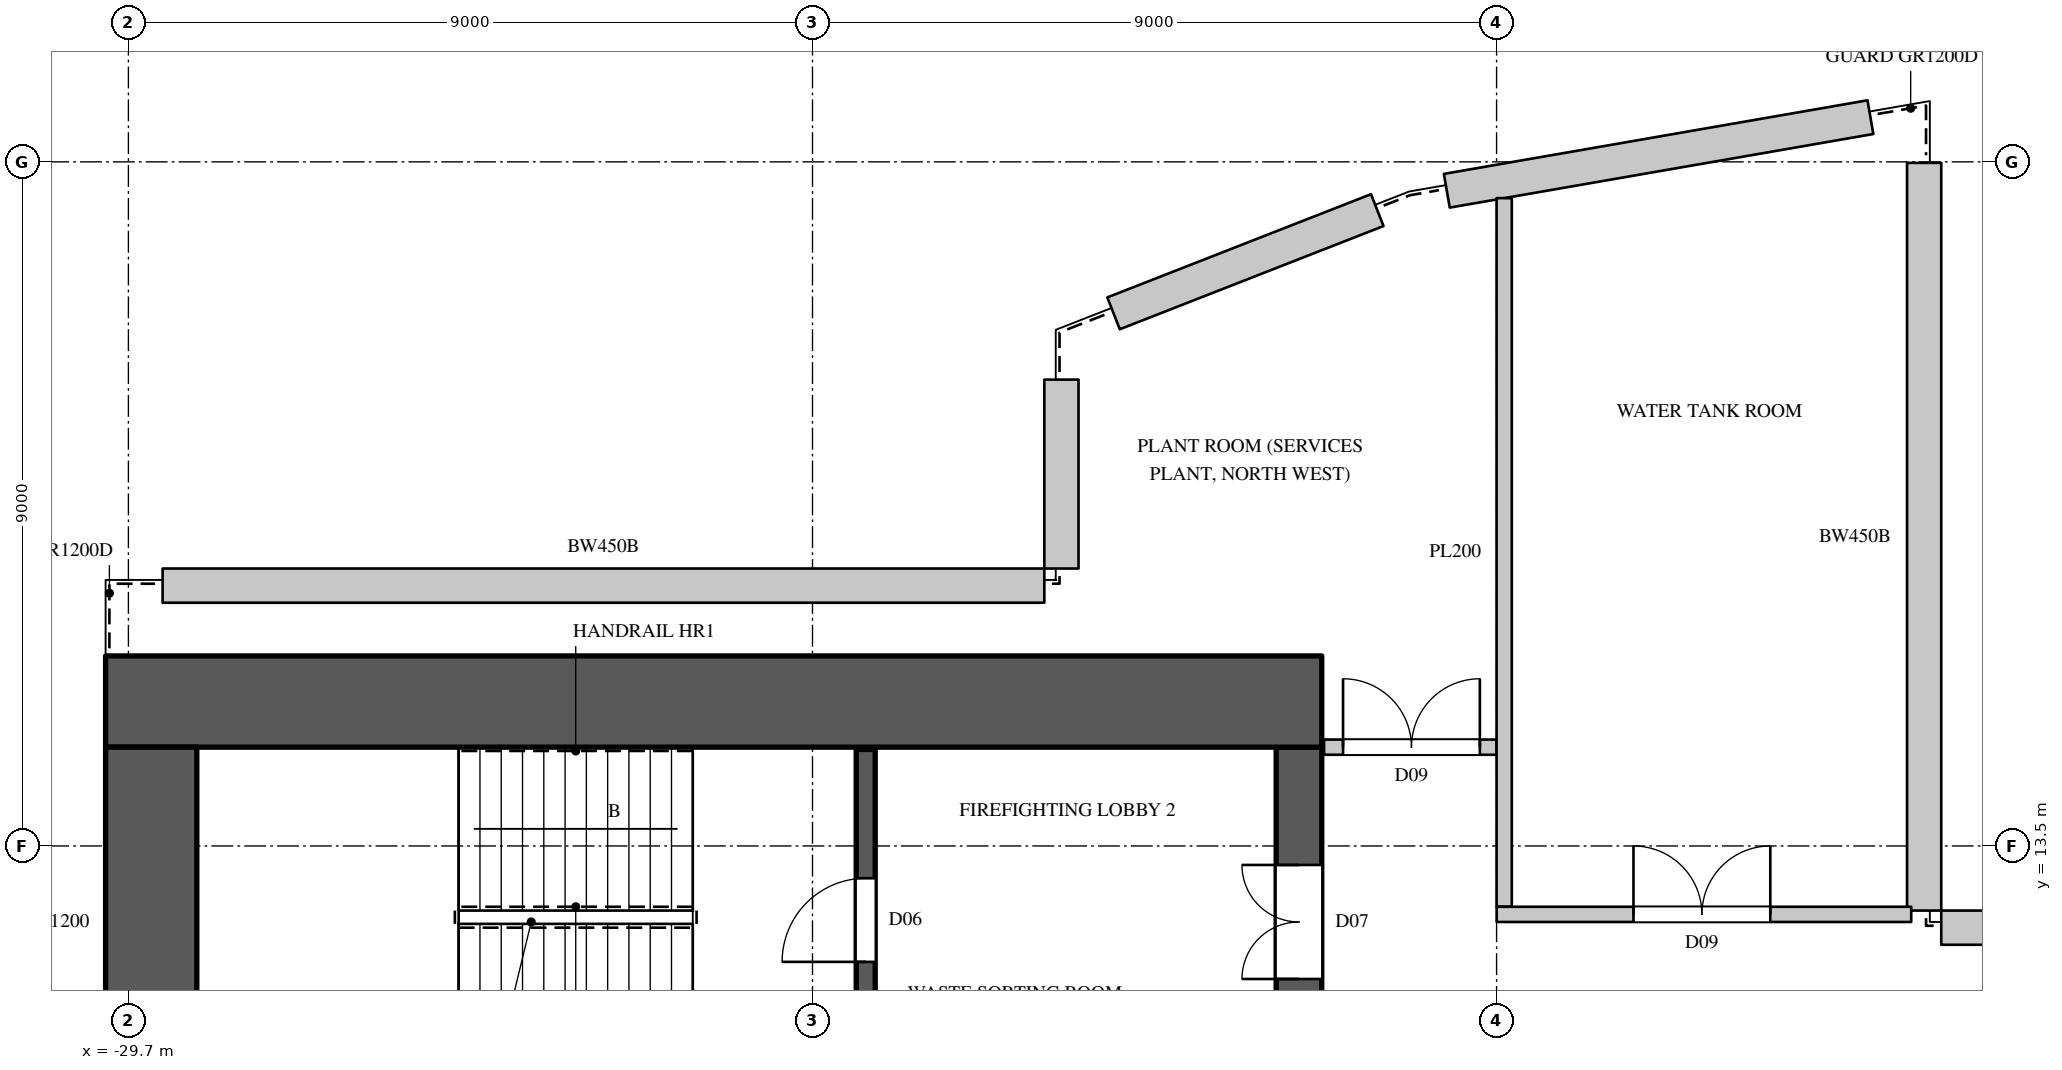
"""IFC4 building model, lengths in metres.
Left out: names, types, materials, properties, quantities, classifications, styles, units other than length and angle.
Written with IfcOpenShell. Run it as: python <this file> out.ifc"""

import sys

from ifc_helpers import new_model, si_unit, direction, frame, frame_2d, origin, place, context, subcontext, project, spatial, rectangle, extrude, element, fill, save


model = new_model("IFC4")
c1 = context("Model", 3, precision=1e-05, world=origin(), true_north=direction((0.0, 1.0)))
c2 = subcontext(c1, "Body", "Model", "MODEL_VIEW")
j1 = project(units=[si_unit("LENGTHUNIT", "METRE"), si_unit("PLANEANGLEUNIT", "RADIAN")], contexts=[c1])
p1 = place(None, origin())
s1 = spatial("IfcSite", under=j1, at=p1, CompositionType="ELEMENT")
p2 = place(p1, origin())
s2 = spatial("IfcBuilding", under=s1, at=p2, CompositionType="ELEMENT")
p3 = place(p2, frame((0.0, 0.0, 347.0)))
s3 = spatial("IfcBuildingStorey", under=s2, at=p3, CompositionType="ELEMENT", Elevation=347.0)
p4 = place(p3, frame((7.85, 12.425, 0.0), z_axis=(0.0, 0.0, 1.0), x_axis=(-1.0, 0.0, 0.0)))
e1 = element("IfcWall", 1, at=p4, inside=s3, PredefinedType="SOLIDWALL", context=c2, shape_type="SweptSolid", body=[
    extrude(rectangle(XDim=13.7, YDim=0.45, at=frame_2d((6.85, 0.0))), origin(), (0.0, 0.0, 1.0), 3.7),
])
p5 = place(p3, frame((-6.075, 12.65, 0.0), z_axis=(0.0, 0.0, 1.0), x_axis=(0.0, 1.0, 0.0)))
e2 = element("IfcWall", 2, at=p5, inside=s3, PredefinedType="SOLIDWALL", context=c2, shape_type="SweptSolid", body=[
    extrude(rectangle(XDim=9.837, YDim=0.45, at=frame_2d((4.918, 0.0))), origin(), (0.0, 0.0, 1.0), 3.7),
])
p6 = place(p3, frame((-6.782, 23.088, 0.0), z_axis=(0.0, 0.0, 1.0), x_axis=(-0.985240251318, -0.171177239091, 0.0)))
e3 = element("IfcWall", 3, at=p6, inside=s3, PredefinedType="SOLIDWALL", context=c2, shape_type="SweptSolid", body=[
    extrude(rectangle(XDim=5.656, YDim=0.45, at=frame_2d((2.828, 0.0))), origin(), (0.0, 0.0, 1.0), 3.7),
])
p7 = place(p3, frame((-13.27, 21.865, 0.0), z_axis=(0.0, 0.0, 1.0), x_axis=(-0.931207968362, -0.364488298384, 0.0)))
e4 = element("IfcWall", 4, at=p7, inside=s3, PredefinedType="SOLIDWALL", context=c2, shape_type="SweptSolid", body=[
    extrude(rectangle(XDim=3.726, YDim=0.45, at=frame_2d((1.863, 0.0))), origin(), (0.0, 0.0, 1.0), 3.7),
])
p8 = place(p3, frame((-17.425, 19.635, 0.0), z_axis=(0.0, 0.0, 1.0), x_axis=(0.0, -1.0, 0.0)))
e5 = element("IfcWall", 5, at=p8, inside=s3, PredefinedType="SOLIDWALL", context=c2, shape_type="SweptSolid", body=[
    extrude(rectangle(XDim=2.485, YDim=0.45, at=frame_2d((1.243, 0.0))), origin(), (0.0, 0.0, 1.0), 3.7),
])
p9 = place(p3, frame((-17.65, 16.925, 0.0), z_axis=(0.0, 0.0, 1.0), x_axis=(-1.0, 0.0, 0.0)))
e6 = element("IfcWall", 6, at=p9, inside=s3, PredefinedType="SOLIDWALL", context=c2, shape_type="SweptSolid", body=[
    extrude(rectangle(XDim=11.6, YDim=0.45, at=frame_2d((5.8, 0.0))), origin(), (0.0, 0.0, 1.0), 3.7),
])
p10 = place(p3, frame((-30.0, 15.4, 0.0), z_axis=(0.0, 0.0, 1.0), x_axis=(1.0, 0.0, 0.0)))
e7 = element("IfcWall", 7, at=p10, inside=s3, PredefinedType="SHEAR", context=c2, shape_type="SweptSolid", body=[
    extrude(rectangle(XDim=16.0, YDim=1.2, at=frame_2d((8.0, 0.0))), origin(), (0.0, 0.0, 1.0), 4.0),
])
p11 = place(p3, frame((-14.3, -14.8, 0.0), z_axis=(0.0, 0.0, 1.0), x_axis=(0.0, 1.0, 0.0)))
e8 = element("IfcWall", 8, at=p11, inside=s3, PredefinedType="SHEAR", context=c2, shape_type="SweptSolid", body=[
    extrude(rectangle(XDim=29.6, YDim=0.6, at=frame_2d((14.8, 0.0))), origin(), (0.0, 0.0, 1.0), 4.0),
])
p12 = place(p11, frame((1.55, 0.0, 0.0)))
e9 = element("IfcOpeningElement", 9, at=p12, cuts=e8, PredefinedType="OPENING", context=c2, shape_type="SweptSolid", body=[
    extrude(rectangle(XDim=1.5, YDim=2.4, at=frame_2d((0.75, 1.2))), frame((0.0, 0.31, 0.0), z_axis=(0.0, -1.0, 0.0), x_axis=(1.0, 0.0, 0.0)), (0.0, 0.0, 1.0), 0.62),
])
p13 = place(p11, frame((26.55, 0.0, 0.0)))
e10 = element("IfcOpeningElement", 10, at=p13, cuts=e8, PredefinedType="OPENING", context=c2, shape_type="SweptSolid", body=[
    extrude(rectangle(XDim=1.5, YDim=2.4, at=frame_2d((0.75, 1.2))), frame((0.0, 0.31, 0.0), z_axis=(0.0, -1.0, 0.0), x_axis=(1.0, 0.0, 0.0)), (0.0, 0.0, 1.0), 0.62),
])
p14 = place(p11, frame((8.45, 0.0, 0.0)))
e11 = element("IfcOpeningElement", 11, at=p14, cuts=e8, PredefinedType="OPENING", context=c2, shape_type="SweptSolid", body=[
    extrude(rectangle(XDim=1.5, YDim=2.4, at=frame_2d((0.75, 1.2))), frame((0.0, 0.31, 0.0), z_axis=(0.0, -1.0, 0.0), x_axis=(1.0, 0.0, 0.0)), (0.0, 0.0, 1.0), 0.62),
])
p15 = place(p11, frame((19.65, 0.0, 0.0)))
e12 = element("IfcOpeningElement", 12, at=p15, cuts=e8, PredefinedType="OPENING", context=c2, shape_type="SweptSolid", body=[
    extrude(rectangle(XDim=1.5, YDim=2.4, at=frame_2d((0.75, 1.2))), frame((0.0, 0.31, 0.0), z_axis=(0.0, -1.0, 0.0), x_axis=(1.0, 0.0, 0.0)), (0.0, 0.0, 1.0), 0.62),
])
p16 = place(p11, frame((14.5, 0.0, 0.0)))
e13 = element("IfcOpeningElement", 13, at=p16, cuts=e8, PredefinedType="OPENING", context=c2, shape_type="SweptSolid", body=[
    extrude(rectangle(XDim=0.6, YDim=2.0, at=frame_2d((0.3, 1.0))), frame((0.0, 0.31, 0.0), z_axis=(0.0, -1.0, 0.0), x_axis=(1.0, 0.0, 0.0)), (0.0, 0.0, 1.0), 0.62),
])
p17 = place(p3, frame((-29.4, 10.2, 0.0), z_axis=(0.0, 0.0, 1.0), x_axis=(0.0, 1.0, 0.0)))
e14 = element("IfcWall", 14, at=p17, inside=s3, PredefinedType="SHEAR", context=c2, shape_type="SweptSolid", body=[
    extrude(rectangle(XDim=4.6, YDim=1.2, at=frame_2d((2.3, 0.0))), origin(), (0.0, 0.0, 1.0), 4.0),
])
p18 = place(p3, frame((-13.97, 14.8, 0.0), z_axis=(0.0, 0.0, 1.0), x_axis=(1.0, 0.0, 0.0)))
e15 = element("IfcWall", 15, at=p18, inside=s3, PredefinedType="PARTITIONING", context=c2, shape_type="SweptSolid", body=[
    extrude(rectangle(XDim=2.27, YDim=0.2, at=frame_2d((1.135, 0.0))), origin(), (0.0, 0.0, 1.0), 3.598),
])
p19 = place(p18, frame((0.25, 0.0, 0.0)))
e16 = element("IfcOpeningElement", 16, at=p19, cuts=e15, PredefinedType="OPENING", context=c2, shape_type="SweptSolid", body=[
    extrude(rectangle(XDim=1.8, YDim=2.4, at=frame_2d((0.9, 1.2))), frame((0.0, 0.11, 0.0), z_axis=(0.0, -1.0, 0.0), x_axis=(1.0, 0.0, 0.0)), (0.0, 0.0, 1.0), 0.22),
])
p20 = place(p3, frame((-11.6, 12.701, 0.0), z_axis=(0.0, 0.0, 1.0), x_axis=(0.0, 1.0, 0.0)))
e17 = element("IfcWall", 17, at=p20, inside=s3, PredefinedType="PARTITIONING", context=c2, shape_type="SweptSolid", body=[
    extrude(rectangle(XDim=9.322, YDim=0.2, at=frame_2d((4.661, 0.0))), origin(), (0.0, 0.0, 1.0), 3.598),
])
p21 = place(p3, frame((-11.699, 12.6, 0.0), z_axis=(0.0, 0.0, 1.0), x_axis=(1.0, 0.0, 0.0)))
e18 = element("IfcWall", 18, at=p21, inside=s3, PredefinedType="PARTITIONING", context=c2, shape_type="SweptSolid", body=[
    extrude(rectangle(XDim=5.454, YDim=0.2, at=frame_2d((2.727, 0.0))), origin(), (0.0, 0.0, 1.0), 3.598),
])
p22 = place(p21, frame((1.8, 0.0, 0.0)))
e19 = element("IfcOpeningElement", 19, at=p22, cuts=e18, PredefinedType="OPENING", context=c2, shape_type="SweptSolid", body=[
    extrude(rectangle(XDim=1.8, YDim=2.4, at=frame_2d((0.9, 1.2))), frame((0.0, 0.11, 0.0), z_axis=(0.0, -1.0, 0.0), x_axis=(1.0, 0.0, 0.0)), (0.0, 0.0, 1.0), 0.22),
])
p23 = place(p3, frame((-20.0, 10.325, 0.0), z_axis=(0.0, 0.0, 1.0), x_axis=(0.0, 1.0, 0.0)))
e20 = element("IfcWall", 20, at=p23, inside=s3, PredefinedType="SHEAR", context=c2, shape_type="SweptSolid", body=[
    extrude(rectangle(XDim=4.445, YDim=0.25, at=frame_2d((2.223, 0.0))), origin(), (0.0, 0.0, 1.0), 3.598),
])
p24 = place(p23, frame((1.65, 0.0, 0.0)))
e21 = element("IfcOpeningElement", 21, at=p24, cuts=e20, PredefinedType="OPENING", context=c2, shape_type="SweptSolid", body=[
    extrude(rectangle(XDim=1.1, YDim=2.2, at=frame_2d((0.55, 1.1))), frame((0.0, 0.135, 0.0), z_axis=(0.0, -1.0, 0.0), x_axis=(1.0, 0.0, 0.0)), (0.0, 0.0, 1.0), 0.27),
])
p25 = place(p24, origin())
e22 = element("IfcDoor", 22, at=p25, inside=s3, OperationType="SINGLE_SWING_LEFT", PredefinedType="DOOR", context=c2, shape_type="SweptSolid", body=[
    extrude(rectangle(XDim=1.1, YDim=2.2, at=frame_2d((0.55, 1.1))), frame((0.0, 0.025, 0.0), z_axis=(0.0, -1.0, 0.0), x_axis=(1.0, 0.0, 0.0)), (0.0, 0.0, 1.0), 0.05),
])
fill(e21, e22)
p26 = place(p22, origin())
e23 = element("IfcDoor", 23, at=p26, inside=s3, OperationType="DOUBLE_DOOR_SINGLE_SWING", PredefinedType="DOOR", context=c2, shape_type="SweptSolid", body=[
    extrude(rectangle(XDim=1.8, YDim=2.4, at=frame_2d((0.9, 1.2))), frame((0.0, 0.025, 0.0), z_axis=(0.0, -1.0, 0.0), x_axis=(1.0, 0.0, 0.0)), (0.0, 0.0, 1.0), 0.05),
])
fill(e19, e23)
p27 = place(p19, origin())
e24 = element("IfcDoor", 24, at=p27, inside=s3, OperationType="DOUBLE_DOOR_SINGLE_SWING", PredefinedType="DOOR", context=c2, shape_type="SweptSolid", body=[
    extrude(rectangle(XDim=1.8, YDim=2.4, at=frame_2d((0.9, 1.2))), frame((0.0, 0.025, 0.0), z_axis=(0.0, -1.0, 0.0), x_axis=(1.0, 0.0, 0.0)), (0.0, 0.0, 1.0), 0.05),
])
fill(e16, e24)
p28 = place(p13, origin())
e25 = element("IfcDoor", 25, at=p28, inside=s3, OperationType="DOUBLE_DOOR_SINGLE_SWING", PredefinedType="DOOR", context=c2, shape_type="SweptSolid", body=[
    extrude(rectangle(XDim=1.5, YDim=2.4, at=frame_2d((0.75, 1.2))), frame((0.0, 0.295, 0.0), z_axis=(0.0, -1.0, 0.0), x_axis=(1.0, 0.0, 0.0)), (0.0, 0.0, 1.0), 0.05),
])
fill(e10, e25)
save(model, sys.argv[1])
